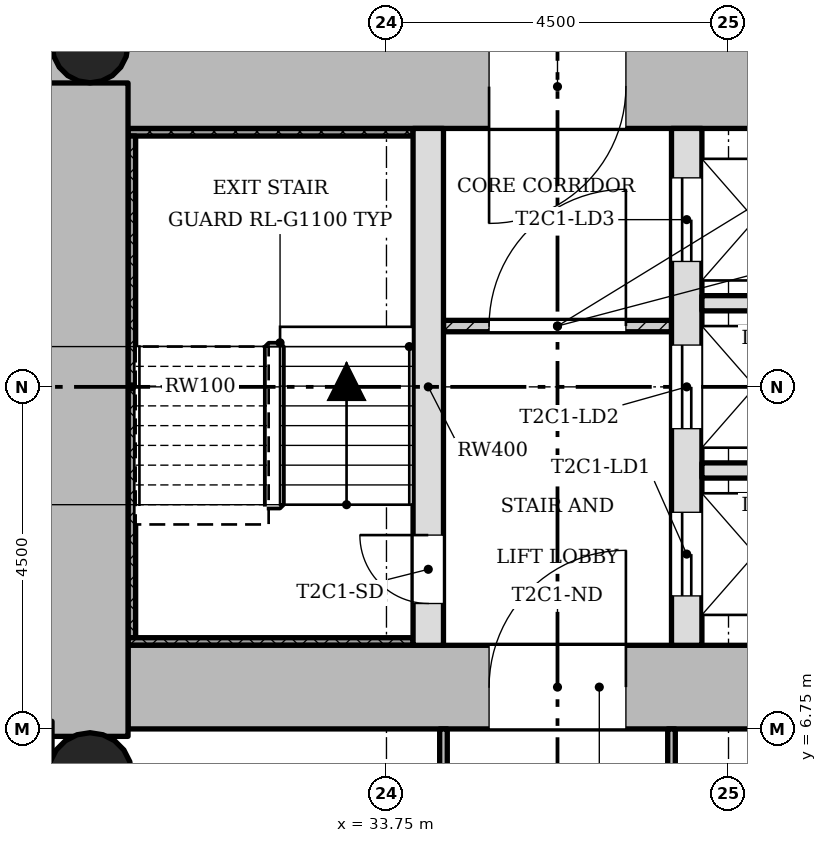
"""IFC4 building model, lengths in metres.
Left out: names, types, materials, properties, quantities, classifications, styles, units other than length and angle.
Written with IfcOpenShell. Run it as: python <this file> out.ifc"""

import sys

from ifc_helpers import new_model, si_unit, direction, frame, frame_2d, origin, origin_2d, place, context, subcontext, project, spatial, rectangle, hollow_circle, extrude, element, fill, save


model = new_model("IFC4")
c1 = context("Model", 3, precision=1e-05, world=origin(), true_north=direction((0.0, 1.0)))
c2 = subcontext(c1, "Body", "Model", "MODEL_VIEW")
j1 = project(units=[si_unit("LENGTHUNIT", "METRE"), si_unit("PLANEANGLEUNIT", "RADIAN")], contexts=[c1])
p1 = place(None, origin())
s1 = spatial("IfcSite", under=j1, at=p1, CompositionType="ELEMENT")
p2 = place(p1, origin())
s2 = spatial("IfcBuilding", under=s1, at=p2, CompositionType="ELEMENT")
p3 = place(p2, frame((0.0, 0.0, 55.1)))
s3 = spatial("IfcBuildingStorey", under=s2, at=p3, CompositionType="ELEMENT", Elevation=55.1)
p4 = place(p3, frame((30.35, 7.3, 0.0), z_axis=(0.0, 0.0, 1.0), x_axis=(1.0, 0.0, 0.0)))
e1 = element("IfcWall", 1, at=p4, inside=s3, PredefinedType="SHEAR", context=c2, shape_type="SweptSolid", body=[
    extrude(rectangle(XDim=12.4, YDim=1.1, at=frame_2d((6.2, 0.0))), origin(), (0.0, 0.0, 1.0), 3.4),
])
p5 = place(p4, frame((4.75, 0.0, 0.0)))
e2 = element("IfcOpeningElement", 2, at=p5, cuts=e1, PredefinedType="OPENING", context=c2, shape_type="SweptSolid", body=[
    extrude(rectangle(XDim=1.8, YDim=2.1, at=frame_2d((0.9, 1.05))), frame((0.0, 0.56, 0.0), z_axis=(0.0, -1.0, 0.0), x_axis=(1.0, 0.0, 0.0)), (0.0, 0.0, 1.0), 1.12),
])
p6 = place(p3, frame((41.65, 15.2, 0.0), z_axis=(0.0, 0.0, 1.0), x_axis=(-1.0, 0.0, 0.0)))
e3 = element("IfcWall", 3, at=p6, inside=s3, PredefinedType="SHEAR", context=c2, shape_type="SweptSolid", body=[
    extrude(rectangle(XDim=12.4, YDim=1.1, at=frame_2d((6.2, 0.0))), origin(), (0.0, 0.0, 1.0), 3.4),
])
p7 = place(p6, frame((4.75, 0.0, 0.0)))
e4 = element("IfcOpeningElement", 4, at=p7, cuts=e3, PredefinedType="OPENING", context=c2, shape_type="SweptSolid", body=[
    extrude(rectangle(XDim=1.8, YDim=2.1, at=frame_2d((0.9, 1.05))), frame((0.0, 0.56, 0.0), z_axis=(0.0, -1.0, 0.0), x_axis=(1.0, 0.0, 0.0)), (0.0, 0.0, 1.0), 1.12),
])
p8 = place(p3, frame((29.8, 15.248, 0.0), z_axis=(0.0, 0.0, 1.0), x_axis=(0.0, -1.0, 0.0)))
e5 = element("IfcWall", 5, at=p8, inside=s3, PredefinedType="SHEAR", context=c2, shape_type="SweptSolid", body=[
    extrude(rectangle(XDim=8.596, YDim=1.1, at=frame_2d((4.298, 0.0))), origin(), (0.0, 0.0, 1.0), 3.4),
])
p9 = place(p3, frame((34.3, 7.85, 0.0), z_axis=(0.0, 0.0, 1.0), x_axis=(0.0, 1.0, 0.0)))
e6 = element("IfcWall", 6, at=p9, inside=s3, PredefinedType="SHEAR", context=c2, shape_type="SweptSolid", body=[
    extrude(rectangle(XDim=6.8, YDim=0.4, at=frame_2d((3.4, 0.0))), origin(), (0.0, 0.0, 1.0), 3.4),
])
p10 = place(p9, frame((0.55, 0.0, 0.0)))
e7 = element("IfcOpeningElement", 7, at=p10, cuts=e6, PredefinedType="OPENING", context=c2, shape_type="SweptSolid", body=[
    extrude(rectangle(XDim=0.9, YDim=2.1, at=frame_2d((0.45, 1.05))), frame((0.0, 0.21, 0.0), z_axis=(0.0, -1.0, 0.0), x_axis=(1.0, 0.0, 0.0)), (0.0, 0.0, 1.0), 0.42),
])
p11 = place(p3, frame((37.7, 7.85, 0.0), z_axis=(0.0, 0.0, 1.0), x_axis=(0.0, 1.0, 0.0)))
e8 = element("IfcWall", 8, at=p11, inside=s3, PredefinedType="SHEAR", context=c2, shape_type="SweptSolid", body=[
    extrude(rectangle(XDim=6.8, YDim=0.4, at=frame_2d((3.4, 0.0))), origin(), (0.0, 0.0, 1.0), 3.4),
])
p12 = place(p11, frame((0.65, 0.0, 0.0)))
e9 = element("IfcOpeningElement", 9, at=p12, cuts=e8, PredefinedType="OPENING", context=c2, shape_type="SweptSolid", body=[
    extrude(rectangle(XDim=1.1, YDim=2.1, at=frame_2d((0.55, 1.05))), frame((0.0, 0.21, 0.0), z_axis=(0.0, -1.0, 0.0), x_axis=(1.0, 0.0, 0.0)), (0.0, 0.0, 1.0), 0.42),
])
p13 = place(p11, frame((2.85, 0.0, 0.0)))
e10 = element("IfcOpeningElement", 10, at=p13, cuts=e8, PredefinedType="OPENING", context=c2, shape_type="SweptSolid", body=[
    extrude(rectangle(XDim=1.1, YDim=2.1, at=frame_2d((0.55, 1.05))), frame((0.0, 0.21, 0.0), z_axis=(0.0, -1.0, 0.0), x_axis=(1.0, 0.0, 0.0)), (0.0, 0.0, 1.0), 0.42),
])
p14 = place(p11, frame((5.05, 0.0, 0.0)))
e11 = element("IfcOpeningElement", 11, at=p14, cuts=e8, PredefinedType="OPENING", context=c2, shape_type="SweptSolid", body=[
    extrude(rectangle(XDim=1.1, YDim=2.1, at=frame_2d((0.55, 1.05))), frame((0.0, 0.21, 0.0), z_axis=(0.0, -1.0, 0.0), x_axis=(1.0, 0.0, 0.0)), (0.0, 0.0, 1.0), 0.42),
])
p15 = place(p3, frame((29.85, 15.75, 0.0), z_axis=(0.0, 0.0, 1.0), x_axis=(1.0, 0.0, 0.0)))
e12 = element("IfcColumn", 12, at=p15, inside=s3, PredefinedType="COLUMN", context=c2, shape_type="SweptSolid", body=[
    extrude(hollow_circle(Radius=0.5, WallThickness=0.036, at=origin_2d()), origin(), (0.0, 0.0, 1.0), 3.4),
])
p16 = place(p3, frame((29.85, 6.15, 0.0), z_axis=(0.0, 0.0, 1.0), x_axis=(1.0, 0.0, 0.0)))
e13 = element("IfcColumn", 13, at=p16, inside=s3, PredefinedType="COLUMN", context=c2, shape_type="SweptSolid", body=[
    extrude(hollow_circle(Radius=0.55, WallThickness=0.04, at=origin_2d()), origin(), (0.0, 0.0, 1.0), 3.4),
])
p17 = place(p3, frame((37.5, 12.05, 0.0), z_axis=(0.0, 0.0, 1.0), x_axis=(-1.0, 0.0, 0.0)))
e14 = element("IfcWall", 14, at=p17, inside=s3, PredefinedType="PARTITIONING", context=c2, shape_type="SweptSolid", body=[
    extrude(rectangle(XDim=3.0, YDim=0.15, at=frame_2d((1.5, 0.0))), origin(), (0.0, 0.0, 1.0), 3.0),
])
p18 = place(p17, frame((0.6, 0.0, 0.0)))
e15 = element("IfcOpeningElement", 15, at=p18, cuts=e14, PredefinedType="OPENING", context=c2, shape_type="SweptSolid", body=[
    extrude(rectangle(XDim=1.8, YDim=2.1, at=frame_2d((0.9, 1.05))), frame((0.0, 0.085, 0.0), z_axis=(0.0, -1.0, 0.0), x_axis=(1.0, 0.0, 0.0)), (0.0, 0.0, 1.0), 0.17),
])
for number, where, z_axis, x_axis in (
    (16, (41.65, 10.15, 0.0), (0.0, 0.0, 1.0), (-1.0, 0.0, 0.0)),
    (17, (41.65, 12.35, 0.0), (0.0, 0.0, 1.0), (-1.0, 0.0, 0.0)),
):
    element("IfcWall", number, at=place(p3, frame(where, z_axis=z_axis, x_axis=x_axis)), inside=s3, PredefinedType="SOLIDWALL", context=c2, shape_type="SweptSolid", body=[
        extrude(rectangle(XDim=3.75, YDim=0.2, at=frame_2d((1.875, 0.0))), origin(), (0.0, 0.0, 1.0), 3.0),
    ])
p19 = place(p3, frame((37.5, 0.9, 0.0), z_axis=(0.0, 0.0, 1.0), x_axis=(0.0, 1.0, 0.0)))
e18 = element("IfcWall", 18, at=p19, inside=s3, PredefinedType="PARTITIONING", context=c2, shape_type="SweptSolid", body=[
    extrude(rectangle(XDim=5.85, YDim=0.1, at=frame_2d((2.925, 0.0))), origin(), (0.0, 0.0, 1.0), 3.0),
])
p20 = place(p19, frame((2.475, 0.0, 0.0)))
e19 = element("IfcOpeningElement", 19, at=p20, cuts=e18, PredefinedType="OPENING", context=c2, shape_type="SweptSolid", body=[
    extrude(rectangle(XDim=0.9, YDim=2.1, at=frame_2d((0.45, 1.05))), frame((0.0, 0.06, 0.0), z_axis=(0.0, -1.0, 0.0), x_axis=(1.0, 0.0, 0.0)), (0.0, 0.0, 1.0), 0.12),
])
p21 = place(p3, frame((34.5, 0.9, 0.0), z_axis=(0.0, 0.0, 1.0), x_axis=(0.0, 1.0, 0.0)))
e20 = element("IfcWall", 20, at=p21, inside=s3, PredefinedType="PARTITIONING", context=c2, shape_type="SweptSolid", body=[
    extrude(rectangle(XDim=5.85, YDim=0.1, at=frame_2d((2.925, 0.0))), origin(), (0.0, 0.0, 1.0), 3.0),
])
p22 = place(p21, frame((2.475, 0.0, 0.0)))
e21 = element("IfcOpeningElement", 21, at=p22, cuts=e20, PredefinedType="OPENING", context=c2, shape_type="SweptSolid", body=[
    extrude(rectangle(XDim=0.9, YDim=2.1, at=frame_2d((0.45, 1.05))), frame((0.0, 0.06, 0.0), z_axis=(0.0, -1.0, 0.0), x_axis=(1.0, 0.0, 0.0)), (0.0, 0.0, 1.0), 0.12),
])
p23 = place(p3, frame((34.1, 14.6, 0.0), z_axis=(0.0, 0.0, 1.0), x_axis=(-1.0, 0.0, 0.0)))
e22 = element("IfcWall", 22, at=p23, inside=s3, PredefinedType="SHEAR", context=c2, shape_type="SweptSolid", body=[
    extrude(rectangle(XDim=3.75, YDim=0.1, at=frame_2d((1.875, 0.0))), origin(), (0.0, 0.0, 1.0), 3.4),
])
p24 = place(p3, frame((30.4, 7.95, 0.0), z_axis=(0.0, 0.0, 1.0), x_axis=(0.0, 1.0, 0.0)))
e23 = element("IfcWall", 23, at=p24, inside=s3, PredefinedType="SHEAR", context=c2, shape_type="SweptSolid", body=[
    extrude(rectangle(XDim=6.6, YDim=0.1, at=frame_2d((3.3, 0.0))), origin(), (0.0, 0.0, 1.0), 3.4),
])
p25 = place(p3, frame((34.1, 7.9, 0.0), z_axis=(0.0, 0.0, 1.0), x_axis=(-1.0, 0.0, 0.0)))
e24 = element("IfcWall", 24, at=p25, inside=s3, PredefinedType="SHEAR", context=c2, shape_type="SweptSolid", body=[
    extrude(rectangle(XDim=3.75, YDim=0.1, at=frame_2d((1.875, 0.0))), origin(), (0.0, 0.0, 1.0), 3.4),
])
p26 = place(p18, origin())
e25 = element("IfcDoor", 25, at=p26, inside=s3, OperationType="SINGLE_SWING_LEFT", PredefinedType="DOOR", context=c2, shape_type="SweptSolid", body=[
    extrude(rectangle(XDim=1.8, YDim=2.1, at=frame_2d((0.9, 1.05))), frame((0.0, 0.025, 0.0), z_axis=(0.0, -1.0, 0.0), x_axis=(1.0, 0.0, 0.0)), (0.0, 0.0, 1.0), 0.05),
])
fill(e15, e25)
p27 = place(p10, origin())
e26 = element("IfcDoor", 26, at=p27, inside=s3, OperationType="SINGLE_SWING_LEFT", PredefinedType="DOOR", context=c2, shape_type="SweptSolid", body=[
    extrude(rectangle(XDim=0.9, YDim=2.1, at=frame_2d((0.45, 1.05))), frame((0.0, 0.025, 0.0), z_axis=(0.0, -1.0, 0.0), x_axis=(1.0, 0.0, 0.0)), (0.0, 0.0, 1.0), 0.05),
])
fill(e7, e26)
p28 = place(p12, origin())
e27 = element("IfcDoor", 27, at=p28, inside=s3, OperationType="SLIDING_TO_LEFT", PredefinedType="DOOR", context=c2, shape_type="SweptSolid", body=[
    extrude(rectangle(XDim=1.1, YDim=2.1, at=frame_2d((0.55, 1.05))), frame((0.0, 0.025, 0.0), z_axis=(0.0, -1.0, 0.0), x_axis=(1.0, 0.0, 0.0)), (0.0, 0.0, 1.0), 0.05),
])
fill(e9, e27)
p29 = place(p13, origin())
e28 = element("IfcDoor", 28, at=p29, inside=s3, OperationType="SLIDING_TO_LEFT", PredefinedType="DOOR", context=c2, shape_type="SweptSolid", body=[
    extrude(rectangle(XDim=1.1, YDim=2.1, at=frame_2d((0.55, 1.05))), frame((0.0, 0.025, 0.0), z_axis=(0.0, -1.0, 0.0), x_axis=(1.0, 0.0, 0.0)), (0.0, 0.0, 1.0), 0.05),
])
fill(e10, e28)
p30 = place(p14, origin())
e29 = element("IfcDoor", 29, at=p30, inside=s3, OperationType="SLIDING_TO_LEFT", PredefinedType="DOOR", context=c2, shape_type="SweptSolid", body=[
    extrude(rectangle(XDim=1.1, YDim=2.1, at=frame_2d((0.55, 1.05))), frame((0.0, 0.025, 0.0), z_axis=(0.0, -1.0, 0.0), x_axis=(1.0, 0.0, 0.0)), (0.0, 0.0, 1.0), 0.05),
])
fill(e11, e29)
p31 = place(p5, origin())
e30 = element("IfcDoor", 30, at=p31, inside=s3, OperationType="SINGLE_SWING_LEFT", PredefinedType="DOOR", context=c2, shape_type="SweptSolid", body=[
    extrude(rectangle(XDim=1.8, YDim=2.1, at=frame_2d((0.9, 1.05))), frame((0.0, 0.025, 0.0), z_axis=(0.0, -1.0, 0.0), x_axis=(1.0, 0.0, 0.0)), (0.0, 0.0, 1.0), 0.05),
])
fill(e2, e30)
p32 = place(p7, origin())
e31 = element("IfcDoor", 31, at=p32, inside=s3, OperationType="SINGLE_SWING_LEFT", PredefinedType="DOOR", context=c2, shape_type="SweptSolid", body=[
    extrude(rectangle(XDim=1.8, YDim=2.1, at=frame_2d((0.9, 1.05))), frame((0.0, 0.025, 0.0), z_axis=(0.0, -1.0, 0.0), x_axis=(1.0, 0.0, 0.0)), (0.0, 0.0, 1.0), 0.05),
])
fill(e4, e31)
save(model, sys.argv[1])
